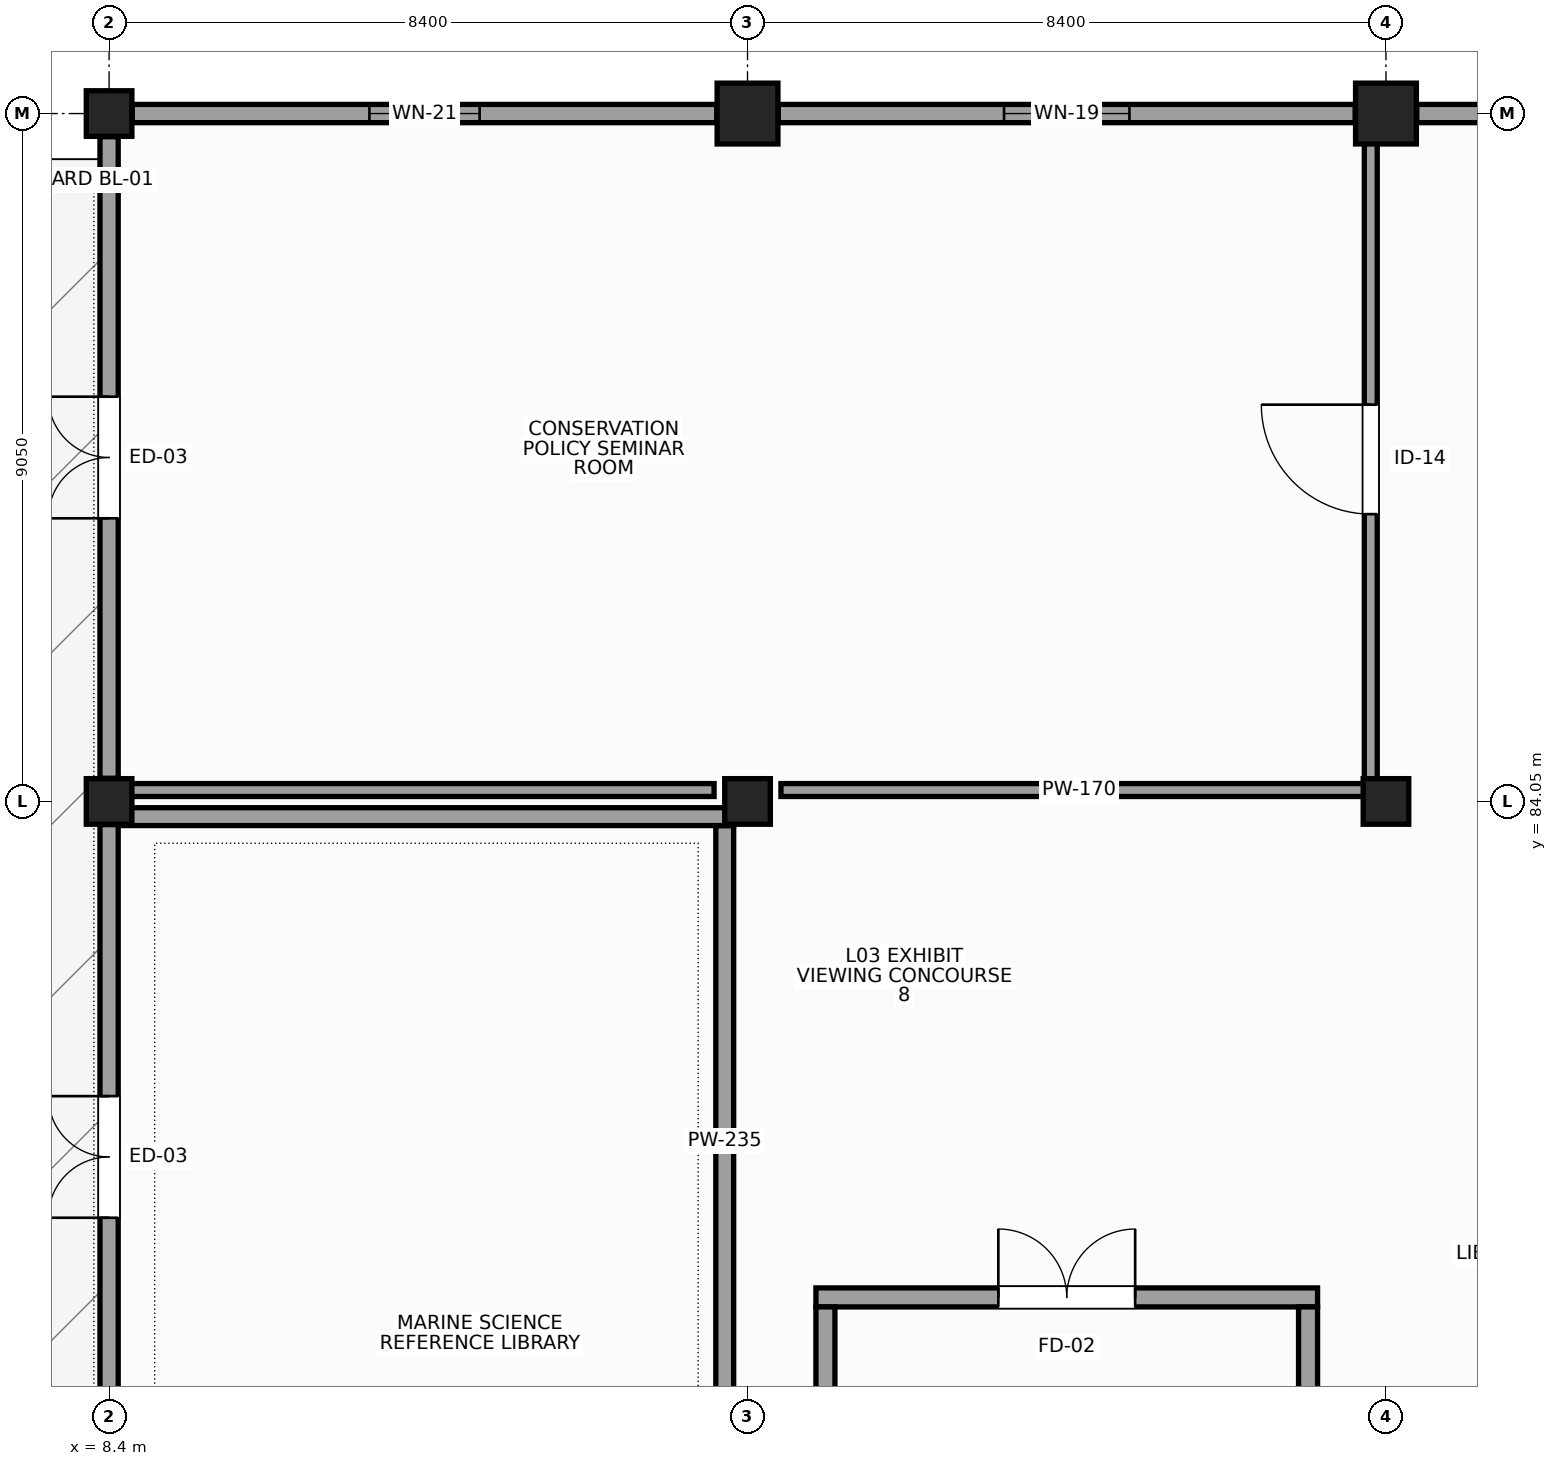
"""IFC4 building model, lengths in metres.
Left out: names, types, materials, properties, quantities, classifications, styles, units other than length and angle.
Written with IfcOpenShell. Run it as: python <this file> out.ifc"""

import sys

from ifc_helpers import new_model, si_unit, direction, frame, frame_2d, origin, origin_2d, place, context, subcontext, project, spatial, rectangle, extrude, element, fill, save


model = new_model("IFC4")
c1 = context("Model", 3, precision=1e-05, world=origin(), true_north=direction((0.0, 1.0)))
c2 = subcontext(c1, "Body", "Model", "MODEL_VIEW")
j1 = project(units=[si_unit("LENGTHUNIT", "METRE"), si_unit("PLANEANGLEUNIT", "RADIAN")], contexts=[c1])
p1 = place(None, origin())
s1 = spatial("IfcSite", under=j1, at=p1, CompositionType="ELEMENT")
p2 = place(p1, origin())
s2 = spatial("IfcBuilding", under=s1, at=p2, CompositionType="ELEMENT")
p3 = place(p2, frame((0.0, 0.0, 15.6)))
s3 = spatial("IfcBuildingStorey", under=s2, at=p3, CompositionType="ELEMENT", Elevation=15.6)
for number, where, z_axis, x_axis in (
    (1, (8.4, 84.05, 0.0), (0.0, 0.0, 1.0), (1.0, 0.0, 0.0)),
    (2, (8.4, 93.1, 0.0), (0.0, 0.0, 1.0), (1.0, 0.0, 0.0)),
    (3, (16.8, 84.05, 0.0), (0.0, 0.0, 1.0), (1.0, 0.0, 0.0)),
):
    element("IfcColumn", number, at=place(p3, frame(where, z_axis=z_axis, x_axis=x_axis)), inside=s3, PredefinedType="COLUMN", context=c2, shape_type="SweptSolid", body=[
        extrude(rectangle(XDim=0.6, YDim=0.6, at=origin_2d()), origin(), (0.0, 0.0, 1.0), 4.5),
    ])
p4 = place(p3, frame((16.8, 93.1, 0.0), z_axis=(0.0, 0.0, 1.0), x_axis=(1.0, 0.0, 0.0)))
e4 = element("IfcColumn", 4, at=p4, inside=s3, PredefinedType="COLUMN", context=c2, shape_type="SweptSolid", body=[
    extrude(rectangle(XDim=0.8, YDim=0.8, at=origin_2d()), origin(), (0.0, 0.0, 1.0), 4.5),
])
p5 = place(p3, frame((25.2, 84.05, 0.0), z_axis=(0.0, 0.0, 1.0), x_axis=(1.0, 0.0, 0.0)))
e5 = element("IfcColumn", 5, at=p5, inside=s3, PredefinedType="COLUMN", context=c2, shape_type="SweptSolid", body=[
    extrude(rectangle(XDim=0.6, YDim=0.6, at=origin_2d()), origin(), (0.0, 0.0, 1.0), 4.5),
])
p6 = place(p3, frame((25.2, 93.1, 0.0), z_axis=(0.0, 0.0, 1.0), x_axis=(1.0, 0.0, 0.0)))
e6 = element("IfcColumn", 6, at=p6, inside=s3, PredefinedType="COLUMN", context=c2, shape_type="SweptSolid", body=[
    extrude(rectangle(XDim=0.8, YDim=0.8, at=origin_2d()), origin(), (0.0, 0.0, 1.0), 4.5),
])
p7 = place(p3, frame((8.4, 92.795, 0.0), z_axis=(0.0, 0.0, 1.0), x_axis=(0.0, -1.0, 0.0)))
e7 = element("IfcWall", 7, at=p7, inside=s3, PredefinedType="STANDARD", context=c2, shape_type="SweptSolid", body=[
    extrude(rectangle(XDim=8.44, YDim=0.24, at=frame_2d((4.22, 0.0))), origin(), (0.0, 0.0, 1.0), 3.631),
])
p8 = place(p7, frame((3.42, 0.0, 0.0)))
e8 = element("IfcOpeningElement", 8, at=p8, cuts=e7, PredefinedType="OPENING", context=c2, shape_type="SweptSolid", body=[
    extrude(rectangle(XDim=1.6, YDim=2.25, at=frame_2d((0.8, 1.125))), frame((0.0, 0.13, 0.0), z_axis=(0.0, -1.0, 0.0), x_axis=(1.0, 0.0, 0.0)), (0.0, 0.0, 1.0), 0.26),
])
p9 = place(p3, frame((8.4, 83.745, 0.0), z_axis=(0.0, 0.0, 1.0), x_axis=(0.0, -1.0, 0.0)))
e9 = element("IfcWall", 9, at=p9, inside=s3, PredefinedType="STANDARD", context=c2, shape_type="SweptSolid", body=[
    extrude(rectangle(XDim=8.745, YDim=0.24, at=frame_2d((4.373, 0.0))), origin(), (0.0, 0.0, 1.0), 4.2),
])
p10 = place(p9, frame((3.572, 0.0, 0.0)))
e10 = element("IfcOpeningElement", 10, at=p10, cuts=e9, PredefinedType="OPENING", context=c2, shape_type="SweptSolid", body=[
    extrude(rectangle(XDim=1.6, YDim=2.25, at=frame_2d((0.8, 1.125))), frame((0.0, 0.13, 0.0), z_axis=(0.0, -1.0, 0.0), x_axis=(1.0, 0.0, 0.0)), (0.0, 0.0, 1.0), 0.26),
])
p11 = place(p3, frame((33.195, 93.1, 0.0), z_axis=(0.0, 0.0, 1.0), x_axis=(-1.0, 0.0, 0.0)))
e11 = element("IfcWall", 11, at=p11, inside=s3, PredefinedType="STANDARD", context=c2, shape_type="SweptSolid", body=[
    extrude(rectangle(XDim=7.59, YDim=0.24, at=frame_2d((3.795, 0.0))), origin(), (0.0, 0.0, 1.0), 3.65),
])
p12 = place(p11, frame((2.545, 0.0, 0.95)))
e12 = element("IfcOpeningElement", 12, at=p12, cuts=e11, PredefinedType="OPENING", context=c2, shape_type="SweptSolid", body=[
    extrude(rectangle(XDim=2.5, YDim=1.75, at=frame_2d((1.25, 0.875))), frame((0.0, 0.13, 0.0), z_axis=(0.0, -1.0, 0.0), x_axis=(1.0, 0.0, 0.0)), (0.0, 0.0, 1.0), 0.26),
])
p13 = place(p3, frame((24.795, 93.1, 0.0), z_axis=(0.0, 0.0, 1.0), x_axis=(-1.0, 0.0, 0.0)))
e13 = element("IfcWall", 13, at=p13, inside=s3, PredefinedType="STANDARD", context=c2, shape_type="SweptSolid", body=[
    extrude(rectangle(XDim=7.59, YDim=0.24, at=frame_2d((3.795, 0.0))), origin(), (0.0, 0.0, 1.0), 3.65),
])
p14 = place(p13, frame((2.97, 0.0, 0.95)))
e14 = element("IfcOpeningElement", 14, at=p14, cuts=e13, PredefinedType="OPENING", context=c2, shape_type="SweptSolid", body=[
    extrude(rectangle(XDim=1.65, YDim=1.85, at=frame_2d((0.825, 0.925))), frame((0.0, 0.13, 0.0), z_axis=(0.0, -1.0, 0.0), x_axis=(1.0, 0.0, 0.0)), (0.0, 0.0, 1.0), 0.26),
])
p15 = place(p3, frame((16.395, 93.1, 0.0), z_axis=(0.0, 0.0, 1.0), x_axis=(-1.0, 0.0, 0.0)))
e15 = element("IfcWall", 15, at=p15, inside=s3, PredefinedType="STANDARD", context=c2, shape_type="SweptSolid", body=[
    extrude(rectangle(XDim=7.69, YDim=0.24, at=frame_2d((3.845, 0.0))), origin(), (0.0, 0.0, 1.0), 3.631),
])
p16 = place(p15, frame((3.12, 0.0, 0.95)))
e16 = element("IfcOpeningElement", 16, at=p16, cuts=e15, PredefinedType="OPENING", context=c2, shape_type="SweptSolid", body=[
    extrude(rectangle(XDim=1.45, YDim=2.05, at=frame_2d((0.725, 1.025))), frame((0.0, 0.13, 0.0), z_axis=(0.0, -1.0, 0.0), x_axis=(1.0, 0.0, 0.0)), (0.0, 0.0, 1.0), 0.26),
])
p17 = place(p3, frame((17.7, 77.525, 0.0), z_axis=(0.0, 0.0, 1.0), x_axis=(1.0, 0.0, 0.0)))
e17 = element("IfcWall", 17, at=p17, inside=s3, PredefinedType="PARTITIONING", context=c2, shape_type="SweptSolid", body=[
    extrude(rectangle(XDim=6.6, YDim=0.25, at=frame_2d((3.3, 0.0))), origin(), (0.0, 0.0, 1.0), 4.2),
])
p18 = place(p17, frame((2.4, 0.0, 0.0)))
e18 = element("IfcOpeningElement", 18, at=p18, cuts=e17, PredefinedType="OPENING", context=c2, shape_type="SweptSolid", body=[
    extrude(rectangle(XDim=1.8, YDim=2.25, at=frame_2d((0.9, 1.125))), frame((0.0, 0.135, 0.0), z_axis=(0.0, -1.0, 0.0), x_axis=(1.0, 0.0, 0.0)), (0.0, 0.0, 1.0), 0.27),
])
for number, where, z_axis, x_axis in (
    (19, (17.825, 74.45, 0.0), (0.0, 0.0, 1.0), (0.0, 1.0, 0.0)),
    (20, (24.175, 74.45, 0.0), (0.0, 0.0, 1.0), (0.0, 1.0, 0.0)),
):
    element("IfcWall", number, at=place(p3, frame(where, z_axis=z_axis, x_axis=x_axis)), inside=s3, PredefinedType="PARTITIONING", context=c2, shape_type="SweptSolid", body=[
        extrude(rectangle(XDim=2.95, YDim=0.25, at=frame_2d((1.475, 0.0))), origin(), (0.0, 0.0, 1.0), 3.825),
    ])
p19 = place(p3, frame((16.5, 75.44, 0.0), z_axis=(0.0, 0.0, 1.0), x_axis=(0.0, 1.0, 0.0)))
e21 = element("IfcWall", 21, at=p19, inside=s3, PredefinedType="PARTITIONING", context=c2, shape_type="SweptSolid", body=[
    extrude(rectangle(XDim=8.292, YDim=0.235, at=frame_2d((4.146, 0.0))), origin(), (0.0, 0.0, 1.0), 4.2),
])
p20 = place(p3, frame((8.533, 83.85, 0.0), z_axis=(0.0, 0.0, 1.0), x_axis=(1.0, 0.0, 0.0)))
e22 = element("IfcWall", 22, at=p20, inside=s3, PredefinedType="PARTITIONING", context=c2, shape_type="SweptSolid", body=[
    extrude(rectangle(XDim=8.084, YDim=0.235, at=frame_2d((4.042, 0.0))), origin(), (0.0, 0.0, 1.0), 3.631),
])
p21 = place(p3, frame((25.0, 84.285, 0.0), z_axis=(0.0, 0.0, 1.0), x_axis=(0.0, 1.0, 0.0)))
e23 = element("IfcWall", 23, at=p21, inside=s3, PredefinedType="PARTITIONING", context=c2, shape_type="SweptSolid", body=[
    extrude(rectangle(XDim=8.53, YDim=0.17, at=frame_2d((4.265, 0.0))), origin(), (0.0, 0.0, 1.0), 3.65),
])
p22 = place(p21, frame((3.545, 0.0, 0.0)))
e24 = element("IfcOpeningElement", 24, at=p22, cuts=e23, PredefinedType="OPENING", context=c2, shape_type="SweptSolid", body=[
    extrude(rectangle(XDim=1.44, YDim=2.35, at=frame_2d((0.72, 1.175))), frame((0.0, 0.095, 0.0), z_axis=(0.0, -1.0, 0.0), x_axis=(1.0, 0.0, 0.0)), (0.0, 0.0, 1.0), 0.19),
])
p23 = place(p3, frame((8.565, 84.2, 0.0), z_axis=(0.0, 0.0, 1.0), x_axis=(1.0, 0.0, 0.0)))
e25 = element("IfcWall", 25, at=p23, inside=s3, PredefinedType="PARTITIONING", context=c2, shape_type="SweptSolid", body=[
    extrude(rectangle(XDim=7.795, YDim=0.17, at=frame_2d((3.897, 0.0))), origin(), (0.0, 0.0, 1.0), 3.631),
])
p24 = place(p3, frame((17.24, 84.2, 0.0), z_axis=(0.0, 0.0, 1.0), x_axis=(1.0, 0.0, 0.0)))
e26 = element("IfcWall", 26, at=p24, inside=s3, PredefinedType="PARTITIONING", context=c2, shape_type="SweptSolid", body=[
    extrude(rectangle(XDim=7.845, YDim=0.17, at=frame_2d((3.922, 0.0))), origin(), (0.0, 0.0, 1.0), 3.825),
])
p25 = place(p8, frame((1.6, 0.0, 0.0), z_axis=(0.0, 0.0, 1.0), x_axis=(-1.0, 0.0, 0.0)))
e27 = element("IfcDoor", 27, at=p25, inside=s3, OperationType="DOUBLE_DOOR_SINGLE_SWING", PredefinedType="DOOR", context=c2, shape_type="SweptSolid", body=[
    extrude(rectangle(XDim=1.6, YDim=2.25, at=frame_2d((0.8, 1.125))), frame((0.0, 0.025, 0.0), z_axis=(0.0, -1.0, 0.0), x_axis=(1.0, 0.0, 0.0)), (0.0, 0.0, 1.0), 0.05),
])
fill(e8, e27)
p26 = place(p10, frame((1.6, 0.0, 0.0), z_axis=(0.0, 0.0, 1.0), x_axis=(-1.0, 0.0, 0.0)))
e28 = element("IfcDoor", 28, at=p26, inside=s3, OperationType="DOUBLE_DOOR_SINGLE_SWING", PredefinedType="DOOR", context=c2, shape_type="SweptSolid", body=[
    extrude(rectangle(XDim=1.6, YDim=2.25, at=frame_2d((0.8, 1.125))), frame((0.0, 0.025, 0.0), z_axis=(0.0, -1.0, 0.0), x_axis=(1.0, 0.0, 0.0)), (0.0, 0.0, 1.0), 0.05),
])
fill(e10, e28)
p27 = place(p14, origin())
e29 = element("IfcWindow", 29, at=p27, inside=s3, PartitioningType="SINGLE_PANEL", PredefinedType="WINDOW", context=c2, shape_type="SweptSolid", body=[
    extrude(rectangle(XDim=1.65, YDim=1.85, at=frame_2d((0.825, 0.925))), frame((0.0, 0.03, 0.0), z_axis=(0.0, -1.0, 0.0), x_axis=(1.0, 0.0, 0.0)), (0.0, 0.0, 1.0), 0.06),
])
fill(e14, e29)
p28 = place(p16, origin())
e30 = element("IfcWindow", 30, at=p28, inside=s3, PartitioningType="SINGLE_PANEL", PredefinedType="WINDOW", context=c2, shape_type="SweptSolid", body=[
    extrude(rectangle(XDim=1.45, YDim=2.05, at=frame_2d((0.725, 1.025))), frame((0.0, 0.03, 0.0), z_axis=(0.0, -1.0, 0.0), x_axis=(1.0, 0.0, 0.0)), (0.0, 0.0, 1.0), 0.06),
])
fill(e16, e30)
p29 = place(p18, origin())
e31 = element("IfcDoor", 31, at=p29, inside=s3, OperationType="DOUBLE_DOOR_SINGLE_SWING", PredefinedType="DOOR", context=c2, shape_type="SweptSolid", body=[
    extrude(rectangle(XDim=1.8, YDim=2.25, at=frame_2d((0.9, 1.125))), frame((0.0, 0.025, 0.0), z_axis=(0.0, -1.0, 0.0), x_axis=(1.0, 0.0, 0.0)), (0.0, 0.0, 1.0), 0.05),
])
fill(e18, e31)
p30 = place(p22, origin())
e32 = element("IfcDoor", 32, at=p30, inside=s3, OperationType="SINGLE_SWING_RIGHT", PredefinedType="DOOR", context=c2, shape_type="SweptSolid", body=[
    extrude(rectangle(XDim=1.44, YDim=2.35, at=frame_2d((0.72, 1.175))), frame((0.0, 0.025, 0.0), z_axis=(0.0, -1.0, 0.0), x_axis=(1.0, 0.0, 0.0)), (0.0, 0.0, 1.0), 0.05),
])
fill(e24, e32)
save(model, sys.argv[1])
